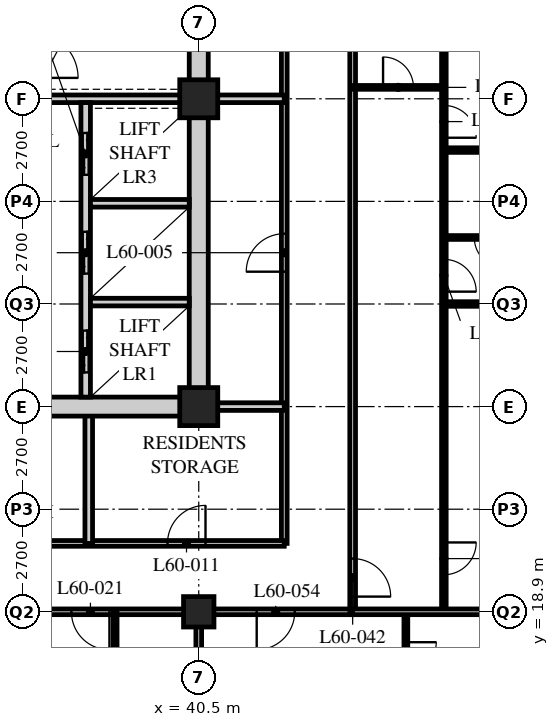
"""IFC4 building model, lengths in metres.
Left out: names, types, materials, properties, quantities, classifications, styles, units other than length and angle.
Written with IfcOpenShell. Run it as: python <this file> out.ifc"""

import sys

from ifc_helpers import new_model, si_unit, direction, frame, frame_2d, origin, origin_2d, place, context, subcontext, project, spatial, rectangle, hollow_rectangle, extrude, element, fill, save


model = new_model("IFC4")
c1 = context("Model", 3, precision=1e-05, world=origin(), true_north=direction((0.0, 1.0)))
c2 = subcontext(c1, "Body", "Model", "MODEL_VIEW")
j1 = project(units=[si_unit("LENGTHUNIT", "METRE"), si_unit("PLANEANGLEUNIT", "RADIAN")], contexts=[c1])
p1 = place(None, origin())
s1 = spatial("IfcSite", under=j1, at=p1, CompositionType="ELEMENT")
p2 = place(p1, origin())
s2 = spatial("IfcBuilding", under=s1, at=p2, CompositionType="ELEMENT")
p3 = place(p2, frame((0.0, 0.0, 231.6)))
s3 = spatial("IfcBuildingStorey", under=s2, at=p3, CompositionType="ELEMENT", Elevation=231.6)
p4 = place(p3, frame((40.5, 18.9, 0.0), z_axis=(0.0, 0.0, 1.0), x_axis=(1.0, 0.0, 0.0)))
e1 = element("IfcColumn", 1, at=p4, inside=s3, PredefinedType="COLUMN", context=c2, shape_type="SweptSolid", body=[
    extrude(hollow_rectangle(XDim=0.8, YDim=0.8, WallThickness=0.08, at=origin_2d()), origin(), (0.0, 0.0, 1.0), 3.6),
])
for number, where, z_axis, x_axis in (
    (2, (40.5, 24.3, 0.0), (0.0, 0.0, 1.0), (1.0, 0.0, 0.0)),
    (3, (40.5, 32.4, 0.0), (0.0, 0.0, 1.0), (1.0, 0.0, 0.0)),
):
    element("IfcColumn", number, at=place(p3, frame(where, z_axis=z_axis, x_axis=x_axis)), inside=s3, PredefinedType="COLUMN", context=c2, shape_type="SweptSolid", body=[
        extrude(hollow_rectangle(XDim=1.0, YDim=1.0, WallThickness=0.1, at=origin_2d()), origin(), (0.0, 0.0, 1.0), 3.6),
    ])
p5 = place(p3, frame((8.1, 18.9, 0.0), z_axis=(0.0, 0.0, 1.0), x_axis=(1.0, 0.0, 0.0)))
e4 = element("IfcWall", 4, at=p5, inside=s3, PredefinedType="PARTITIONING", context=c2, shape_type="SweptSolid", body=[
    extrude(rectangle(XDim=36.45, YDim=0.15, at=frame_2d((18.225, 0.0))), origin(), (0.0, 0.0, 1.0), 2.35),
])
p6 = place(p5, frame((4.45, 0.0, 0.0)))
e5 = element("IfcOpeningElement", 5, at=p6, cuts=e4, PredefinedType="OPENING", context=c2, shape_type="SweptSolid", body=[
    extrude(rectangle(XDim=1.0, YDim=2.1, at=frame_2d((0.5, 1.05))), frame((0.0, 0.085, 0.0), z_axis=(0.0, -1.0, 0.0), x_axis=(1.0, 0.0, 0.0)), (0.0, 0.0, 1.0), 0.17),
])
p7 = place(p5, frame((17.1, 0.0, 0.0)))
e6 = element("IfcOpeningElement", 6, at=p7, cuts=e4, PredefinedType="OPENING", context=c2, shape_type="SweptSolid", body=[
    extrude(rectangle(XDim=1.0, YDim=2.1, at=frame_2d((0.5, 1.05))), frame((0.0, 0.085, 0.0), z_axis=(0.0, -1.0, 0.0), x_axis=(1.0, 0.0, 0.0)), (0.0, 0.0, 1.0), 0.17),
])
p8 = place(p5, frame((29.05, 0.0, 0.0)))
e7 = element("IfcOpeningElement", 7, at=p8, cuts=e4, PredefinedType="OPENING", context=c2, shape_type="SweptSolid", body=[
    extrude(rectangle(XDim=1.0, YDim=2.1, at=frame_2d((0.5, 1.05))), frame((0.0, 0.085, 0.0), z_axis=(0.0, -1.0, 0.0), x_axis=(1.0, 0.0, 0.0)), (0.0, 0.0, 1.0), 0.17),
])
p9 = place(p5, frame((2.625, 0.0, 0.0)))
e8 = element("IfcOpeningElement", 8, at=p9, cuts=e4, PredefinedType="OPENING", context=c2, shape_type="SweptSolid", body=[
    extrude(rectangle(XDim=1.0, YDim=2.1, at=frame_2d((0.5, 1.05))), frame((0.0, 0.085, 0.0), z_axis=(0.0, -1.0, 0.0), x_axis=(1.0, 0.0, 0.0)), (0.0, 0.0, 1.0), 0.17),
])
p10 = place(p5, frame((33.925, 0.0, 0.0)))
e9 = element("IfcOpeningElement", 9, at=p10, cuts=e4, PredefinedType="OPENING", context=c2, shape_type="SweptSolid", body=[
    extrude(rectangle(XDim=1.0, YDim=2.1, at=frame_2d((0.5, 1.05))), frame((0.0, 0.085, 0.0), z_axis=(0.0, -1.0, 0.0), x_axis=(1.0, 0.0, 0.0)), (0.0, 0.0, 1.0), 0.17),
])
p11 = place(p3, frame((44.55, 18.9, 0.0), z_axis=(0.0, 0.0, 1.0), x_axis=(0.0, 1.0, 0.0)))
e10 = element("IfcWall", 10, at=p11, inside=s3, PredefinedType="PARTITIONING", context=c2, shape_type="SweptSolid", body=[
    extrude(rectangle(XDim=24.3, YDim=0.15, at=frame_2d((12.15, 0.0))), origin(), (0.0, 0.0, 1.0), 3.35),
])
p12 = place(p11, frame((0.4, 0.0, 0.0)))
e11 = element("IfcOpeningElement", 11, at=p12, cuts=e10, PredefinedType="OPENING", context=c2, shape_type="SweptSolid", body=[
    extrude(rectangle(XDim=1.0, YDim=2.1, at=frame_2d((0.5, 1.05))), frame((0.0, 0.085, 0.0), z_axis=(0.0, -1.0, 0.0), x_axis=(1.0, 0.0, 0.0)), (0.0, 0.0, 1.0), 0.17),
])
p13 = place(p11, frame((16.6, 0.0, 0.0)))
e12 = element("IfcOpeningElement", 12, at=p13, cuts=e10, PredefinedType="OPENING", context=c2, shape_type="SweptSolid", body=[
    extrude(rectangle(XDim=1.0, YDim=2.1, at=frame_2d((0.5, 1.05))), frame((0.0, 0.085, 0.0), z_axis=(0.0, -1.0, 0.0), x_axis=(1.0, 0.0, 0.0)), (0.0, 0.0, 1.0), 0.17),
])
p14 = place(p3, frame((42.75, 20.7, 0.0), z_axis=(0.0, 0.0, 1.0), x_axis=(0.0, 1.0, 0.0)))
e13 = element("IfcWall", 13, at=p14, inside=s3, PredefinedType="PARTITIONING", context=c2, shape_type="SweptSolid", body=[
    extrude(rectangle(XDim=19.8, YDim=0.15, at=frame_2d((9.9, 0.0))), origin(), (0.0, 0.0, 1.0), 3.35),
])
p15 = place(p14, frame((7.15, 0.0, 0.0)))
e14 = element("IfcOpeningElement", 14, at=p15, cuts=e13, PredefinedType="OPENING", context=c2, shape_type="SweptSolid", body=[
    extrude(rectangle(XDim=1.0, YDim=2.1, at=frame_2d((0.5, 1.05))), frame((0.0, 0.085, 0.0), z_axis=(0.0, -1.0, 0.0), x_axis=(1.0, 0.0, 0.0)), (0.0, 0.0, 1.0), 0.17),
])
p16 = place(p14, frame((15.25, 0.0, 0.0)))
e15 = element("IfcOpeningElement", 15, at=p16, cuts=e13, PredefinedType="OPENING", context=c2, shape_type="SweptSolid", body=[
    extrude(rectangle(XDim=1.0, YDim=2.1, at=frame_2d((0.5, 1.05))), frame((0.0, 0.085, 0.0), z_axis=(0.0, -1.0, 0.0), x_axis=(1.0, 0.0, 0.0)), (0.0, 0.0, 1.0), 0.17),
])
p17 = place(p3, frame((29.56, 20.7, 0.0), z_axis=(0.0, 0.0, 1.0), x_axis=(1.0, 0.0, 0.0)))
e16 = element("IfcWall", 16, at=p17, inside=s3, PredefinedType="PARTITIONING", context=c2, shape_type="SweptSolid", body=[
    extrude(rectangle(XDim=13.19, YDim=0.15, at=frame_2d((6.595, 0.0))), origin(), (0.0, 0.0, 1.0), 3.35),
])
p18 = place(p17, frame((3.518, 0.0, 0.0)))
e17 = element("IfcOpeningElement", 17, at=p18, cuts=e16, PredefinedType="OPENING", context=c2, shape_type="SweptSolid", body=[
    extrude(rectangle(XDim=1.0, YDim=2.1, at=frame_2d((0.5, 1.05))), frame((0.0, 0.085, 0.0), z_axis=(0.0, -1.0, 0.0), x_axis=(1.0, 0.0, 0.0)), (0.0, 0.0, 1.0), 0.17),
])
p19 = place(p17, frame((10.118, 0.0, 0.0)))
e18 = element("IfcOpeningElement", 18, at=p19, cuts=e16, PredefinedType="OPENING", context=c2, shape_type="SweptSolid", body=[
    extrude(rectangle(XDim=1.0, YDim=2.1, at=frame_2d((0.5, 1.05))), frame((0.0, 0.085, 0.0), z_axis=(0.0, -1.0, 0.0), x_axis=(1.0, 0.0, 0.0)), (0.0, 0.0, 1.0), 0.17),
])
p20 = place(p3, frame((40.5, 32.4, 0.0), z_axis=(0.0, 0.0, 1.0), x_axis=(1.0, 0.0, 0.0)))
e19 = element("IfcWall", 19, at=p20, inside=s3, PredefinedType="SOLIDWALL", context=c2, shape_type="SweptSolid", body=[
    extrude(rectangle(XDim=2.25, YDim=0.2, at=frame_2d((1.125, 0.0))), origin(), (0.0, 0.0, 1.0), 3.35),
])
p21 = place(p3, frame((37.606, 20.7, 0.0), z_axis=(0.0, 0.0, 1.0), x_axis=(0.0, 1.0, 0.0)))
e20 = element("IfcWall", 20, at=p21, inside=s3, PredefinedType="SOLIDWALL", context=c2, shape_type="SweptSolid", body=[
    extrude(rectangle(XDim=3.6, YDim=0.2, at=frame_2d((1.8, 0.0))), origin(), (0.0, 0.0, 1.0), 3.35),
])
p22 = place(p3, frame((40.5, 24.3, 0.0), z_axis=(0.0, 0.0, 1.0), x_axis=(1.0, 0.0, 0.0)))
e21 = element("IfcWall", 21, at=p22, inside=s3, PredefinedType="SOLIDWALL", context=c2, shape_type="SweptSolid", body=[
    extrude(rectangle(XDim=2.25, YDim=0.2, at=frame_2d((1.125, 0.0))), origin(), (0.0, 0.0, 1.0), 3.35),
])
p23 = place(p3, frame((38.3, 18.9, 0.0), z_axis=(0.0, 0.0, 1.0), x_axis=(0.0, -1.0, 0.0)))
e22 = element("IfcWall", 22, at=p23, inside=s3, PredefinedType="PARTITIONING", context=c2, shape_type="SweptSolid", body=[
    extrude(rectangle(XDim=2.4, YDim=0.1, at=frame_2d((1.2, 0.0))), origin(), (0.0, 0.0, 1.0), 3.35),
])
p24 = place(p23, frame((1.35, 0.0, 0.0)))
e23 = element("IfcOpeningElement", 23, at=p24, cuts=e22, PredefinedType="OPENING", context=c2, shape_type="SweptSolid", body=[
    extrude(rectangle(XDim=0.8, YDim=2.1, at=frame_2d((0.4, 1.05))), frame((0.0, 0.06, 0.0), z_axis=(0.0, -1.0, 0.0), x_axis=(1.0, 0.0, 0.0)), (0.0, 0.0, 1.0), 0.12),
])
p25 = place(p3, frame((46.95, 18.9, 0.0), z_axis=(0.0, 0.0, 1.0), x_axis=(0.0, 1.0, 0.0)))
e24 = element("IfcWall", 24, at=p25, inside=s3, PredefinedType="PARTITIONING", context=c2, shape_type="SweptSolid", body=[
    extrude(rectangle(XDim=24.3, YDim=0.12, at=frame_2d((12.15, 0.0))), origin(), (0.0, 0.0, 1.0), 3.35),
])
p26 = place(p25, frame((0.975, 0.0, 0.0)))
e25 = element("IfcOpeningElement", 25, at=p26, cuts=e24, PredefinedType="OPENING", context=c2, shape_type="SweptSolid", body=[
    extrude(rectangle(XDim=0.85, YDim=2.1, at=frame_2d((0.425, 1.05))), frame((0.0, 0.07, 0.0), z_axis=(0.0, -1.0, 0.0), x_axis=(1.0, 0.0, 0.0)), (0.0, 0.0, 1.0), 0.14),
])
p27 = place(p25, frame((8.425, 0.0, 0.0)))
e26 = element("IfcOpeningElement", 26, at=p27, cuts=e24, PredefinedType="OPENING", context=c2, shape_type="SweptSolid", body=[
    extrude(rectangle(XDim=0.85, YDim=2.1, at=frame_2d((0.425, 1.05))), frame((0.0, 0.07, 0.0), z_axis=(0.0, -1.0, 0.0), x_axis=(1.0, 0.0, 0.0)), (0.0, 0.0, 1.0), 0.14),
])
p28 = place(p25, frame((12.475, 0.0, 0.0)))
e27 = element("IfcOpeningElement", 27, at=p28, cuts=e24, PredefinedType="OPENING", context=c2, shape_type="SweptSolid", body=[
    extrude(rectangle(XDim=0.85, YDim=2.1, at=frame_2d((0.425, 1.05))), frame((0.0, 0.07, 0.0), z_axis=(0.0, -1.0, 0.0), x_axis=(1.0, 0.0, 0.0)), (0.0, 0.0, 1.0), 0.14),
])
p29 = place(p25, frame((17.175, 0.0, 0.0)))
e28 = element("IfcOpeningElement", 28, at=p29, cuts=e24, PredefinedType="OPENING", context=c2, shape_type="SweptSolid", body=[
    extrude(rectangle(XDim=0.85, YDim=2.1, at=frame_2d((0.425, 1.05))), frame((0.0, 0.07, 0.0), z_axis=(0.0, -1.0, 0.0), x_axis=(1.0, 0.0, 0.0)), (0.0, 0.0, 1.0), 0.14),
])
p30 = place(p25, frame((20.575, 0.0, 0.0)))
e29 = element("IfcOpeningElement", 29, at=p30, cuts=e24, PredefinedType="OPENING", context=c2, shape_type="SweptSolid", body=[
    extrude(rectangle(XDim=0.85, YDim=2.1, at=frame_2d((0.425, 1.05))), frame((0.0, 0.07, 0.0), z_axis=(0.0, -1.0, 0.0), x_axis=(1.0, 0.0, 0.0)), (0.0, 0.0, 1.0), 0.14),
])
p31 = place(p3, frame((44.55, 32.7, 0.0), z_axis=(0.0, 0.0, 1.0), x_axis=(1.0, 0.0, 0.0)))
e30 = element("IfcWall", 30, at=p31, inside=s3, PredefinedType="PARTITIONING", context=c2, shape_type="SweptSolid", body=[
    extrude(rectangle(XDim=2.4, YDim=0.1, at=frame_2d((1.2, 0.0))), origin(), (0.0, 0.0, 1.0), 3.35),
])
p32 = place(p31, frame((0.8, 0.0, 0.0)))
e31 = element("IfcOpeningElement", 31, at=p32, cuts=e30, PredefinedType="OPENING", context=c2, shape_type="SweptSolid", body=[
    extrude(rectangle(XDim=0.8, YDim=2.1, at=frame_2d((0.4, 1.05))), frame((0.0, 0.06, 0.0), z_axis=(0.0, -1.0, 0.0), x_axis=(1.0, 0.0, 0.0)), (0.0, 0.0, 1.0), 0.12),
])
p33 = place(p3, frame((46.95, 28.75, 0.0), z_axis=(0.0, 0.0, 1.0), x_axis=(1.0, 0.0, 0.0)))
e32 = element("IfcWall", 32, at=p33, inside=s3, PredefinedType="PARTITIONING", context=c2, shape_type="SweptSolid", body=[
    extrude(rectangle(XDim=2.4, YDim=0.1, at=frame_2d((1.2, 0.0))), origin(), (0.0, 0.0, 1.0), 3.35),
])
p34 = place(p33, frame((0.8, 0.0, 0.0)))
e33 = element("IfcOpeningElement", 33, at=p34, cuts=e32, PredefinedType="OPENING", context=c2, shape_type="SweptSolid", body=[
    extrude(rectangle(XDim=0.8, YDim=2.1, at=frame_2d((0.4, 1.05))), frame((0.0, 0.06, 0.0), z_axis=(0.0, -1.0, 0.0), x_axis=(1.0, 0.0, 0.0)), (0.0, 0.0, 1.0), 0.12),
])
p35 = place(p3, frame((46.95, 27.0, 0.0), z_axis=(0.0, 0.0, 1.0), x_axis=(1.0, 0.0, 0.0)))
e34 = element("IfcWall", 34, at=p35, inside=s3, PredefinedType="PARTITIONING", context=c2, shape_type="SweptSolid", body=[
    extrude(rectangle(XDim=9.45, YDim=0.12, at=frame_2d((4.725, 0.0))), origin(), (0.0, 0.0, 1.0), 2.588),
])
p36 = place(p3, frame((46.95, 31.05, 0.0), z_axis=(0.0, 0.0, 1.0), x_axis=(1.0, 0.0, 0.0)))
e35 = element("IfcWall", 35, at=p36, inside=s3, PredefinedType="PARTITIONING", context=c2, shape_type="SweptSolid", body=[
    extrude(rectangle(XDim=9.45, YDim=0.12, at=frame_2d((4.725, 0.0))), origin(), (0.0, 0.0, 1.0), 3.35),
])
p37 = place(p3, frame((45.95, 18.9, 0.0), z_axis=(0.0, 0.0, 1.0), x_axis=(0.0, -1.0, 0.0)))
e36 = element("IfcWall", 36, at=p37, inside=s3, PredefinedType="PARTITIONING", context=c2, shape_type="SweptSolid", body=[
    extrude(rectangle(XDim=2.4, YDim=0.1, at=frame_2d((1.2, 0.0))), origin(), (0.0, 0.0, 1.0), 3.35),
])
p38 = place(p37, frame((0.8, 0.0, 0.0)))
e37 = element("IfcOpeningElement", 37, at=p38, cuts=e36, PredefinedType="OPENING", context=c2, shape_type="SweptSolid", body=[
    extrude(rectangle(XDim=0.8, YDim=2.1, at=frame_2d((0.4, 1.05))), frame((0.0, 0.06, 0.0), z_axis=(0.0, -1.0, 0.0), x_axis=(1.0, 0.0, 0.0)), (0.0, 0.0, 1.0), 0.12),
])
p39 = place(p3, frame((44.55, 18.9, 0.0), z_axis=(0.0, 0.0, 1.0), x_axis=(1.0, 0.0, 0.0)))
e38 = element("IfcWall", 38, at=p39, inside=s3, PredefinedType="PARTITIONING", context=c2, shape_type="SweptSolid", body=[
    extrude(rectangle(XDim=7.8, YDim=0.15, at=frame_2d((3.9, 0.0))), origin(), (0.0, 0.0, 1.0), 2.35),
])
p40 = place(p3, frame((40.5, 18.9, 0.0), z_axis=(0.0, 0.0, 1.0), x_axis=(0.0, -1.0, 0.0)))
e39 = element("IfcWall", 39, at=p40, inside=s3, PredefinedType="PARTITIONING", context=c2, shape_type="SweptSolid", body=[
    extrude(rectangle(XDim=7.8, YDim=0.15, at=frame_2d((3.9, 0.0))), origin(), (0.0, 0.0, 1.0), 2.35),
])
p41 = place(p3, frame((15.95, 24.3, 0.0), z_axis=(0.0, 0.0, 1.0), x_axis=(1.0, 0.0, 0.0)))
e40 = element("IfcWall", 40, at=p41, inside=s3, PredefinedType="SOLIDWALL", context=c2, shape_type="SweptSolid", body=[
    extrude(rectangle(XDim=24.8, YDim=0.5, at=frame_2d((12.4, 0.0))), origin(), (0.0, 0.0, 1.0), 2.588),
])
p42 = place(p41, frame((11.5, 0.0, 0.0)))
e41 = element("IfcOpeningElement", 41, at=p42, cuts=e40, PredefinedType="OPENING", context=c2, shape_type="SweptSolid", body=[
    extrude(rectangle(XDim=1.8, YDim=2.4, at=frame_2d((0.9, 1.2))), frame((0.0, 0.26, 0.0), z_axis=(0.0, -1.0, 0.0), x_axis=(1.0, 0.0, 0.0)), (0.0, 0.0, 1.0), 0.52),
])
p43 = place(p3, frame((40.5, 24.55, 0.0), z_axis=(0.0, 0.0, 1.0), x_axis=(0.0, 1.0, 0.0)))
e42 = element("IfcWall", 42, at=p43, inside=s3, PredefinedType="SOLIDWALL", context=c2, shape_type="SweptSolid", body=[
    extrude(rectangle(XDim=15.7, YDim=0.5, at=frame_2d((7.85, 0.0))), origin(), (0.0, 0.0, 1.0), 2.35),
])
p44 = place(p3, frame((32.3, 32.4, 0.0), z_axis=(0.0, 0.0, 1.0), x_axis=(1.0, 0.0, 0.0)))
e43 = element("IfcWall", 43, at=p44, inside=s3, PredefinedType="SOLIDWALL", context=c2, shape_type="SweptSolid", body=[
    extrude(rectangle(XDim=7.95, YDim=0.2, at=frame_2d((3.975, 0.0))), origin(), (0.0, 0.0, 1.0), 2.588),
])
p45 = place(p3, frame((37.525, 24.55, 0.0), z_axis=(0.0, 0.0, 1.0), x_axis=(0.0, 1.0, 0.0)))
e44 = element("IfcWall", 44, at=p45, inside=s3, PredefinedType="SOLIDWALL", context=c2, shape_type="SweptSolid", body=[
    extrude(rectangle(XDim=7.75, YDim=0.25, at=frame_2d((3.875, 0.0))), origin(), (0.0, 0.0, 1.0), 3.35),
])
p46 = place(p45, frame((0.65, 0.0, 0.0)))
e45 = element("IfcOpeningElement", 45, at=p46, cuts=e44, PredefinedType="OPENING", context=c2, shape_type="SweptSolid", body=[
    extrude(rectangle(XDim=1.1, YDim=2.4, at=frame_2d((0.55, 1.2))), frame((0.0, 0.135, 0.0), z_axis=(0.0, -1.0, 0.0), x_axis=(1.0, 0.0, 0.0)), (0.0, 0.0, 1.0), 0.27),
])
p47 = place(p45, frame((3.25, 0.0, 0.0)))
e46 = element("IfcOpeningElement", 46, at=p47, cuts=e44, PredefinedType="OPENING", context=c2, shape_type="SweptSolid", body=[
    extrude(rectangle(XDim=1.1, YDim=2.4, at=frame_2d((0.55, 1.2))), frame((0.0, 0.135, 0.0), z_axis=(0.0, -1.0, 0.0), x_axis=(1.0, 0.0, 0.0)), (0.0, 0.0, 1.0), 0.27),
])
p48 = place(p45, frame((5.85, 0.0, 0.0)))
e47 = element("IfcOpeningElement", 47, at=p48, cuts=e44, PredefinedType="OPENING", context=c2, shape_type="SweptSolid", body=[
    extrude(rectangle(XDim=1.1, YDim=2.4, at=frame_2d((0.55, 1.2))), frame((0.0, 0.135, 0.0), z_axis=(0.0, -1.0, 0.0), x_axis=(1.0, 0.0, 0.0)), (0.0, 0.0, 1.0), 0.27),
])
for number, where, z_axis, x_axis in (
    (48, (37.65, 27.05, 0.0), (0.0, 0.0, 1.0), (1.0, 0.0, 0.0)),
    (49, (37.65, 29.65, 0.0), (0.0, 0.0, 1.0), (1.0, 0.0, 0.0)),
):
    element("IfcWall", number, at=place(p3, frame(where, z_axis=z_axis, x_axis=x_axis)), inside=s3, PredefinedType="SOLIDWALL", context=c2, shape_type="SweptSolid", body=[
        extrude(rectangle(XDim=2.6, YDim=0.2, at=frame_2d((1.3, 0.0))), origin(), (0.0, 0.0, 1.0), 3.35),
    ])
p49 = place(p15, origin())
e50 = element("IfcDoor", 50, at=p49, inside=s3, OperationType="SINGLE_SWING_LEFT", PredefinedType="DOOR", context=c2, shape_type="SweptSolid", body=[
    extrude(rectangle(XDim=1.0, YDim=2.1, at=frame_2d((0.5, 1.05))), frame((0.0, 0.025, 0.0), z_axis=(0.0, -1.0, 0.0), x_axis=(1.0, 0.0, 0.0)), (0.0, 0.0, 1.0), 0.05),
])
fill(e14, e50)
p50 = place(p19, origin())
e51 = element("IfcDoor", 51, at=p50, inside=s3, OperationType="SINGLE_SWING_RIGHT", PredefinedType="DOOR", context=c2, shape_type="SweptSolid", body=[
    extrude(rectangle(XDim=1.0, YDim=2.1, at=frame_2d((0.5, 1.05))), frame((0.0, 0.025, 0.0), z_axis=(0.0, -1.0, 0.0), x_axis=(1.0, 0.0, 0.0)), (0.0, 0.0, 1.0), 0.05),
])
fill(e18, e51)
p51 = place(p8, origin())
e52 = element("IfcDoor", 52, at=p51, inside=s3, OperationType="SINGLE_SWING_LEFT", PredefinedType="DOOR", context=c2, shape_type="SweptSolid", body=[
    extrude(rectangle(XDim=1.0, YDim=2.1, at=frame_2d((0.5, 1.05))), frame((0.0, 0.025, 0.0), z_axis=(0.0, -1.0, 0.0), x_axis=(1.0, 0.0, 0.0)), (0.0, 0.0, 1.0), 0.05),
])
fill(e7, e52)
p52 = place(p32, origin())
e53 = element("IfcDoor", 53, at=p52, inside=s3, OperationType="SINGLE_SWING_LEFT", PredefinedType="DOOR", context=c2, shape_type="SweptSolid", body=[
    extrude(rectangle(XDim=0.8, YDim=2.1, at=frame_2d((0.4, 1.05))), frame((0.0, 0.025, 0.0), z_axis=(0.0, -1.0, 0.0), x_axis=(1.0, 0.0, 0.0)), (0.0, 0.0, 1.0), 0.05),
])
fill(e31, e53)
p53 = place(p12, origin())
e54 = element("IfcDoor", 54, at=p53, inside=s3, OperationType="SINGLE_SWING_RIGHT", PredefinedType="DOOR", context=c2, shape_type="SweptSolid", body=[
    extrude(rectangle(XDim=1.0, YDim=2.1, at=frame_2d((0.5, 1.05))), frame((0.0, 0.025, 0.0), z_axis=(0.0, -1.0, 0.0), x_axis=(1.0, 0.0, 0.0)), (0.0, 0.0, 1.0), 0.05),
])
fill(e11, e54)
p54 = place(p26, origin())
e55 = element("IfcDoor", 55, at=p54, inside=s3, OperationType="SINGLE_SWING_LEFT", PredefinedType="DOOR", context=c2, shape_type="SweptSolid", body=[
    extrude(rectangle(XDim=0.85, YDim=2.1, at=frame_2d((0.425, 1.05))), frame((0.0, 0.025, 0.0), z_axis=(0.0, -1.0, 0.0), x_axis=(1.0, 0.0, 0.0)), (0.0, 0.0, 1.0), 0.05),
])
fill(e25, e55)
p55 = place(p34, origin())
e56 = element("IfcDoor", 56, at=p55, inside=s3, OperationType="SINGLE_SWING_LEFT", PredefinedType="DOOR", context=c2, shape_type="SweptSolid", body=[
    extrude(rectangle(XDim=0.8, YDim=2.1, at=frame_2d((0.4, 1.05))), frame((0.0, 0.025, 0.0), z_axis=(0.0, -1.0, 0.0), x_axis=(1.0, 0.0, 0.0)), (0.0, 0.0, 1.0), 0.05),
])
fill(e33, e56)
p56 = place(p27, origin())
e57 = element("IfcDoor", 57, at=p56, inside=s3, OperationType="SINGLE_SWING_RIGHT", PredefinedType="DOOR", context=c2, shape_type="SweptSolid", body=[
    extrude(rectangle(XDim=0.85, YDim=2.1, at=frame_2d((0.425, 1.05))), frame((0.0, 0.025, 0.0), z_axis=(0.0, -1.0, 0.0), x_axis=(1.0, 0.0, 0.0)), (0.0, 0.0, 1.0), 0.05),
])
fill(e26, e57)
p57 = place(p28, origin())
e58 = element("IfcDoor", 58, at=p57, inside=s3, OperationType="SINGLE_SWING_RIGHT", PredefinedType="DOOR", context=c2, shape_type="SweptSolid", body=[
    extrude(rectangle(XDim=0.85, YDim=2.1, at=frame_2d((0.425, 1.05))), frame((0.0, 0.025, 0.0), z_axis=(0.0, -1.0, 0.0), x_axis=(1.0, 0.0, 0.0)), (0.0, 0.0, 1.0), 0.05),
])
fill(e27, e58)
p58 = place(p10, origin())
e59 = element("IfcDoor", 59, at=p58, inside=s3, OperationType="SINGLE_SWING_RIGHT", PredefinedType="DOOR", context=c2, shape_type="SweptSolid", body=[
    extrude(rectangle(XDim=1.0, YDim=2.1, at=frame_2d((0.5, 1.05))), frame((0.0, 0.025, 0.0), z_axis=(0.0, -1.0, 0.0), x_axis=(1.0, 0.0, 0.0)), (0.0, 0.0, 1.0), 0.05),
])
fill(e9, e59)
p59 = place(p38, origin())
e60 = element("IfcDoor", 60, at=p59, inside=s3, OperationType="SINGLE_SWING_LEFT", PredefinedType="DOOR", context=c2, shape_type="SweptSolid", body=[
    extrude(rectangle(XDim=0.8, YDim=2.1, at=frame_2d((0.4, 1.05))), frame((0.0, 0.025, 0.0), z_axis=(0.0, -1.0, 0.0), x_axis=(1.0, 0.0, 0.0)), (0.0, 0.0, 1.0), 0.05),
])
fill(e37, e60)
p60 = place(p46, origin())
e61 = element("IfcDoor", 61, at=p60, inside=s3, OperationType="DOUBLE_DOOR_SLIDING", PredefinedType="DOOR", context=c2, shape_type="SweptSolid", body=[
    extrude(rectangle(XDim=1.1, YDim=2.4, at=frame_2d((0.55, 1.2))), frame((0.0, 0.025, 0.0), z_axis=(0.0, -1.0, 0.0), x_axis=(1.0, 0.0, 0.0)), (0.0, 0.0, 1.0), 0.05),
])
fill(e45, e61)
p61 = place(p47, origin())
e62 = element("IfcDoor", 62, at=p61, inside=s3, OperationType="DOUBLE_DOOR_SLIDING", PredefinedType="DOOR", context=c2, shape_type="SweptSolid", body=[
    extrude(rectangle(XDim=1.1, YDim=2.4, at=frame_2d((0.55, 1.2))), frame((0.0, 0.025, 0.0), z_axis=(0.0, -1.0, 0.0), x_axis=(1.0, 0.0, 0.0)), (0.0, 0.0, 1.0), 0.05),
])
fill(e46, e62)
p62 = place(p48, origin())
e63 = element("IfcDoor", 63, at=p62, inside=s3, OperationType="DOUBLE_DOOR_SLIDING", PredefinedType="DOOR", context=c2, shape_type="SweptSolid", body=[
    extrude(rectangle(XDim=1.1, YDim=2.4, at=frame_2d((0.55, 1.2))), frame((0.0, 0.025, 0.0), z_axis=(0.0, -1.0, 0.0), x_axis=(1.0, 0.0, 0.0)), (0.0, 0.0, 1.0), 0.05),
])
fill(e47, e63)
save(model, sys.argv[1])
